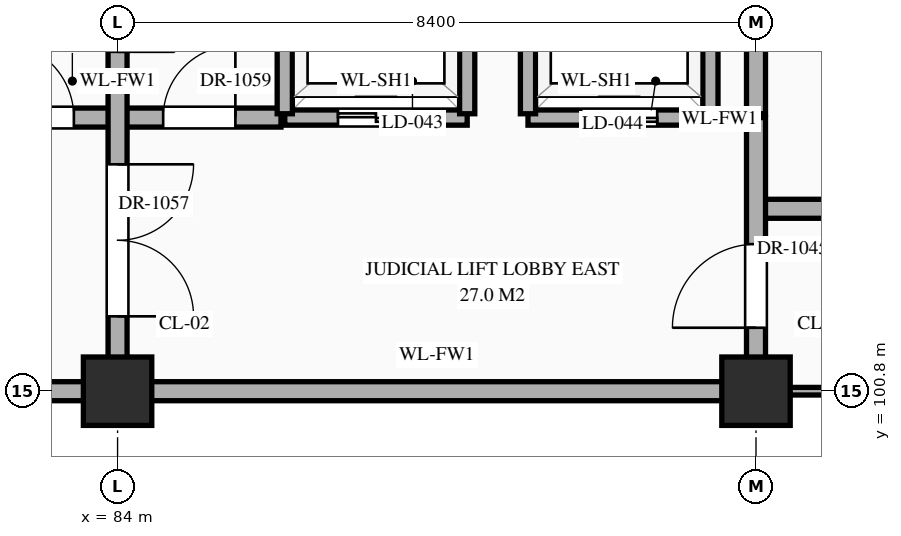
"""IFC4 building model, lengths in metres.
Left out: names, types, materials, properties, quantities, classifications, styles, units other than length and angle.
Written with IfcOpenShell. Run it as: python <this file> out.ifc"""

import sys

from ifc_helpers import new_model, si_unit, direction, frame, frame_2d, origin, origin_2d, place, context, subcontext, project, spatial, rectangle, extrude, element, fill, save


model = new_model("IFC4")
c1 = context("Model", 3, precision=1e-05, world=origin(), true_north=direction((0.0, 1.0)))
c2 = subcontext(c1, "Body", "Model", "MODEL_VIEW")
j1 = project(units=[si_unit("LENGTHUNIT", "METRE"), si_unit("PLANEANGLEUNIT", "RADIAN")], contexts=[c1])
p1 = place(None, origin())
s1 = spatial("IfcSite", under=j1, at=p1, CompositionType="ELEMENT")
p2 = place(p1, origin())
s2 = spatial("IfcBuilding", under=s1, at=p2, CompositionType="ELEMENT")
p3 = place(p2, frame((0.0, 0.0, 5.4)))
s3 = spatial("IfcBuildingStorey", under=s2, at=p3, CompositionType="ELEMENT", Elevation=5.4)
for number, where, z_axis, x_axis in (
    (1, (84.0, 100.8, 0.0), (0.0, 0.0, 1.0), (1.0, 0.0, 0.0)),
    (2, (92.4, 100.8, 0.0), (0.0, 0.0, 1.0), (1.0, 0.0, 0.0)),
):
    element("IfcColumn", number, at=place(p3, frame(where, z_axis=z_axis, x_axis=x_axis)), inside=s3, PredefinedType="COLUMN", context=c2, shape_type="SweptSolid", body=[
        extrude(rectangle(XDim=0.9, YDim=0.9, at=origin_2d()), origin(), (0.0, 0.0, 1.0), 5.4),
    ])
for number, where, z_axis, x_axis in (
    (3, (75.65, 100.8, 0.0), (0.0, 0.0, 1.0), (1.0, 0.0, 0.0)),
    (4, (84.05, 100.8, 0.0), (0.0, 0.0, 1.0), (1.0, 0.0, 0.0)),
):
    element("IfcWall", number, at=place(p3, frame(where, z_axis=z_axis, x_axis=x_axis)), inside=s3, PredefinedType="STANDARD", context=c2, shape_type="SweptSolid", body=[
        extrude(rectangle(XDim=8.3, YDim=0.25, at=frame_2d((4.15, 0.0))), origin(), (0.0, 0.0, 1.0), 4.27),
    ])
p4 = place(p3, frame((92.45, 100.8, 0.0), z_axis=(0.0, 0.0, 1.0), x_axis=(1.0, 0.0, 0.0)))
e5 = element("IfcWall", 5, at=p4, inside=s3, PredefinedType="STANDARD", context=c2, shape_type="SweptSolid", body=[
    extrude(rectangle(XDim=4.1, YDim=0.1, at=frame_2d((2.05, 0.0))), origin(), (0.0, 0.0, 1.0), 4.27),
])
p5 = place(p3, frame((92.4, 103.2, 0.0), z_axis=(0.0, 0.0, 1.0), x_axis=(1.0, 0.0, 0.0)))
e6 = element("IfcWall", 6, at=p5, inside=s3, PredefinedType="STANDARD", context=c2, shape_type="SweptSolid", body=[
    extrude(rectangle(XDim=4.2, YDim=0.25, at=frame_2d((2.1, 0.0))), origin(), (0.0, 0.0, 1.0), 5.12),
])
p6 = place(p5, frame((1.6, 0.0, 0.0)))
e7 = element("IfcOpeningElement", 7, at=p6, cuts=e6, PredefinedType="OPENING", context=c2, shape_type="SweptSolid", body=[
    extrude(rectangle(XDim=1.0, YDim=2.2, at=frame_2d((0.5, 1.1))), frame((0.0, 0.137, 0.0), z_axis=(0.0, -1.0, 0.0), x_axis=(1.0, 0.0, 0.0)), (0.0, 0.0, 1.0), 0.274),
])
p7 = place(p3, frame((81.85, 104.4, 0.0), z_axis=(0.0, 0.0, 1.0), x_axis=(1.0, 0.0, 0.0)))
e8 = element("IfcWall", 8, at=p7, inside=s3, PredefinedType="STANDARD", context=c2, shape_type="SweptSolid", body=[
    extrude(rectangle(XDim=4.3, YDim=0.25, at=frame_2d((2.15, 0.0))), origin(), (0.0, 0.0, 1.0), 5.12),
])
p8 = place(p7, frame((0.575, 0.0, 0.0)))
e9 = element("IfcOpeningElement", 9, at=p8, cuts=e8, PredefinedType="OPENING", context=c2, shape_type="SweptSolid", body=[
    extrude(rectangle(XDim=1.0, YDim=2.2, at=frame_2d((0.5, 1.1))), frame((0.0, 0.137, 0.0), z_axis=(0.0, -1.0, 0.0), x_axis=(1.0, 0.0, 0.0)), (0.0, 0.0, 1.0), 0.274),
])
p9 = place(p7, frame((2.75, 0.0, 0.0)))
e10 = element("IfcOpeningElement", 10, at=p9, cuts=e8, PredefinedType="OPENING", context=c2, shape_type="SweptSolid", body=[
    extrude(rectangle(XDim=0.95, YDim=2.15, at=frame_2d((0.475, 1.075))), frame((0.0, 0.137, 0.0), z_axis=(0.0, -1.0, 0.0), x_axis=(1.0, 0.0, 0.0)), (0.0, 0.0, 1.0), 0.274),
])
p10 = place(p3, frame((86.2, 104.4, 0.0), z_axis=(0.0, 0.0, 1.0), x_axis=(1.0, 0.0, 0.0)))
e11 = element("IfcWall", 11, at=p10, inside=s3, PredefinedType="STANDARD", context=c2, shape_type="SweptSolid", body=[
    extrude(rectangle(XDim=2.4, YDim=0.2, at=frame_2d((1.2, 0.0))), origin(), (0.0, 0.0, 1.0), 5.12),
])
p11 = place(p10, frame((0.7, 0.0, 0.0)))
e12 = element("IfcOpeningElement", 12, at=p11, cuts=e11, PredefinedType="OPENING", context=c2, shape_type="SweptSolid", body=[
    extrude(rectangle(XDim=1.0, YDim=2.15, at=frame_2d((0.5, 1.075))), frame((0.0, 0.112, 0.0), z_axis=(0.0, -1.0, 0.0), x_axis=(1.0, 0.0, 0.0)), (0.0, 0.0, 1.0), 0.224),
])
p12 = place(p3, frame((89.4, 104.4, 0.0), z_axis=(0.0, 0.0, 1.0), x_axis=(1.0, 0.0, 0.0)))
e13 = element("IfcWall", 13, at=p12, inside=s3, PredefinedType="STANDARD", context=c2, shape_type="SweptSolid", body=[
    extrude(rectangle(XDim=2.4, YDim=0.2, at=frame_2d((1.2, 0.0))), origin(), (0.0, 0.0, 1.0), 5.12),
])
p13 = place(p12, frame((0.7, 0.0, 0.0)))
e14 = element("IfcOpeningElement", 14, at=p13, cuts=e13, PredefinedType="OPENING", context=c2, shape_type="SweptSolid", body=[
    extrude(rectangle(XDim=1.0, YDim=2.15, at=frame_2d((0.5, 1.075))), frame((0.0, 0.112, 0.0), z_axis=(0.0, -1.0, 0.0), x_axis=(1.0, 0.0, 0.0)), (0.0, 0.0, 1.0), 0.224),
])
p14 = place(p3, frame((84.0, 100.8, 0.0), z_axis=(0.0, 0.0, 1.0), x_axis=(0.0, 1.0, 0.0)))
e15 = element("IfcWall", 15, at=p14, inside=s3, PredefinedType="STANDARD", context=c2, shape_type="SweptSolid", body=[
    extrude(rectangle(XDim=14.36, YDim=0.25, at=frame_2d((7.18, 0.0))), origin(), (0.0, 0.0, 1.0), 4.37),
])
p15 = place(p14, frame((0.985, 0.0, 0.0)))
e16 = element("IfcOpeningElement", 16, at=p15, cuts=e15, PredefinedType="OPENING", context=c2, shape_type="SweptSolid", body=[
    extrude(rectangle(XDim=2.0, YDim=2.4, at=frame_2d((1.0, 1.2))), frame((0.0, 0.137, 0.0), z_axis=(0.0, -1.0, 0.0), x_axis=(1.0, 0.0, 0.0)), (0.0, 0.0, 1.0), 0.274),
])
p16 = place(p14, frame((4.465, 0.0, 0.0)))
e17 = element("IfcOpeningElement", 17, at=p16, cuts=e15, PredefinedType="OPENING", context=c2, shape_type="SweptSolid", body=[
    extrude(rectangle(XDim=1.5, YDim=2.25, at=frame_2d((0.75, 1.125))), frame((0.0, 0.137, 0.0), z_axis=(0.0, -1.0, 0.0), x_axis=(1.0, 0.0, 0.0)), (0.0, 0.0, 1.0), 0.274),
])
p17 = place(p14, frame((8.035, 0.0, 0.0)))
e18 = element("IfcOpeningElement", 18, at=p17, cuts=e15, PredefinedType="OPENING", context=c2, shape_type="SweptSolid", body=[
    extrude(rectangle(XDim=1.1, YDim=2.2, at=frame_2d((0.55, 1.1))), frame((0.0, 0.137, 0.0), z_axis=(0.0, -1.0, 0.0), x_axis=(1.0, 0.0, 0.0)), (0.0, 0.0, 1.0), 0.274),
])
for number, where, z_axis, x_axis in (
    (19, (86.2, 104.45, 0.0), (0.0, 0.0, 1.0), (0.0, 1.0, 0.0)),
    (20, (88.6, 104.45, 0.0), (0.0, 0.0, 1.0), (0.0, 1.0, 0.0)),
    (21, (89.4, 104.45, 0.0), (0.0, 0.0, 1.0), (0.0, 1.0, 0.0)),
    (22, (91.8, 104.45, 0.0), (0.0, 0.0, 1.0), (0.0, 1.0, 0.0)),
):
    element("IfcWall", number, at=place(p3, frame(where, z_axis=z_axis, x_axis=x_axis)), inside=s3, PredefinedType="STANDARD", context=c2, shape_type="SweptSolid", body=[
        extrude(rectangle(XDim=2.3, YDim=0.2, at=frame_2d((1.15, 0.0))), origin(), (0.0, 0.0, 1.0), 5.12),
    ])
p18 = place(p3, frame((92.4, 100.8, 0.0), z_axis=(0.0, 0.0, 1.0), x_axis=(0.0, 1.0, 0.0)))
e23 = element("IfcWall", 23, at=p18, inside=s3, PredefinedType="STANDARD", context=c2, shape_type="SweptSolid", body=[
    extrude(rectangle(XDim=3.6, YDim=0.25, at=frame_2d((1.8, 0.0))), origin(), (0.0, 0.0, 1.0), 4.37),
])
p19 = place(p18, frame((0.835, 0.0, 0.0)))
e24 = element("IfcOpeningElement", 24, at=p19, cuts=e23, PredefinedType="OPENING", context=c2, shape_type="SweptSolid", body=[
    extrude(rectangle(XDim=1.1, YDim=2.2, at=frame_2d((0.55, 1.1))), frame((0.0, 0.137, 0.0), z_axis=(0.0, -1.0, 0.0), x_axis=(1.0, 0.0, 0.0)), (0.0, 0.0, 1.0), 0.274),
])
p20 = place(p3, frame((92.4, 104.45, 0.0), z_axis=(0.0, 0.0, 1.0), x_axis=(0.0, 1.0, 0.0)))
e25 = element("IfcWall", 25, at=p20, inside=s3, PredefinedType="STANDARD", context=c2, shape_type="SweptSolid", body=[
    extrude(rectangle(XDim=3.5, YDim=0.25, at=frame_2d((1.75, 0.0))), origin(), (0.0, 0.0, 1.0), 4.37),
])
p21 = place(p11, origin())
e26 = element("IfcDoor", 26, at=p21, inside=s3, OperationType="DOUBLE_DOOR_SLIDING", PredefinedType="DOOR", context=c2, shape_type="SweptSolid", body=[
    extrude(rectangle(XDim=1.0, YDim=2.15, at=frame_2d((0.5, 1.075))), frame((0.0, 0.025, 0.0), z_axis=(0.0, -1.0, 0.0), x_axis=(1.0, 0.0, 0.0)), (0.0, 0.0, 1.0), 0.05),
])
fill(e12, e26)
p22 = place(p13, origin())
e27 = element("IfcDoor", 27, at=p22, inside=s3, OperationType="DOUBLE_DOOR_SLIDING", PredefinedType="DOOR", context=c2, shape_type="SweptSolid", body=[
    extrude(rectangle(XDim=1.0, YDim=2.15, at=frame_2d((0.5, 1.075))), frame((0.0, 0.025, 0.0), z_axis=(0.0, -1.0, 0.0), x_axis=(1.0, 0.0, 0.0)), (0.0, 0.0, 1.0), 0.05),
])
fill(e14, e27)
p23 = place(p19, origin())
e28 = element("IfcDoor", 28, at=p23, inside=s3, OperationType="SINGLE_SWING_LEFT", PredefinedType="DOOR", context=c2, shape_type="SweptSolid", body=[
    extrude(rectangle(XDim=1.1, YDim=2.2, at=frame_2d((0.55, 1.1))), frame((0.0, 0.025, 0.0), z_axis=(0.0, -1.0, 0.0), x_axis=(1.0, 0.0, 0.0)), (0.0, 0.0, 1.0), 0.05),
])
fill(e24, e28)
p24 = place(p15, frame((2.0, 0.0, 0.0), z_axis=(0.0, 0.0, 1.0), x_axis=(-1.0, 0.0, 0.0)))
e29 = element("IfcDoor", 29, at=p24, inside=s3, OperationType="DOUBLE_DOOR_SINGLE_SWING", PredefinedType="DOOR", context=c2, shape_type="SweptSolid", body=[
    extrude(rectangle(XDim=2.0, YDim=2.4, at=frame_2d((1.0, 1.2))), frame((0.0, 0.025, 0.0), z_axis=(0.0, -1.0, 0.0), x_axis=(1.0, 0.0, 0.0)), (0.0, 0.0, 1.0), 0.05),
])
fill(e16, e29)
p25 = place(p8, origin())
e30 = element("IfcDoor", 30, at=p25, inside=s3, OperationType="SINGLE_SWING_LEFT", PredefinedType="DOOR", context=c2, shape_type="SweptSolid", body=[
    extrude(rectangle(XDim=1.0, YDim=2.2, at=frame_2d((0.5, 1.1))), frame((0.0, 0.025, 0.0), z_axis=(0.0, -1.0, 0.0), x_axis=(1.0, 0.0, 0.0)), (0.0, 0.0, 1.0), 0.05),
])
fill(e9, e30)
p26 = place(p9, origin())
e31 = element("IfcDoor", 31, at=p26, inside=s3, OperationType="SINGLE_SWING_RIGHT", PredefinedType="DOOR", context=c2, shape_type="SweptSolid", body=[
    extrude(rectangle(XDim=0.95, YDim=2.15, at=frame_2d((0.475, 1.075))), frame((0.0, 0.025, 0.0), z_axis=(0.0, -1.0, 0.0), x_axis=(1.0, 0.0, 0.0)), (0.0, 0.0, 1.0), 0.05),
])
fill(e10, e31)
save(model, sys.argv[1])
